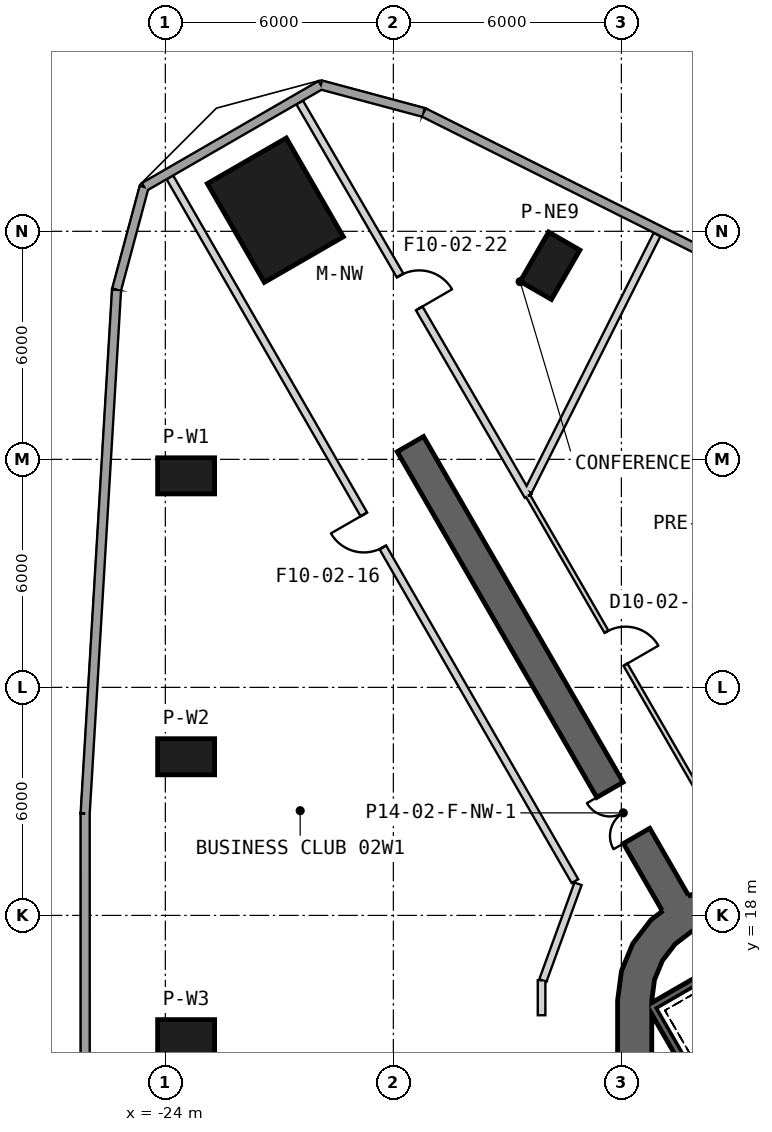
"""IFC4 building model, lengths in metres.
Left out: names, types, materials, properties, quantities, classifications, styles, units other than length and angle.
Written with IfcOpenShell. Run it as: python <this file> out.ifc"""

import sys

from ifc_helpers import new_model, si_unit, direction, frame, frame_2d, origin, origin_2d, place, context, subcontext, project, spatial, polyline, rectangle, outline, extrude, element, fill, save


model = new_model("IFC4")
c1 = context("Model", 3, precision=1e-05, world=origin(), true_north=direction((0.0, 1.0)))
c2 = subcontext(c1, "Body", "Model", "MODEL_VIEW")
j1 = project(units=[si_unit("LENGTHUNIT", "METRE"), si_unit("PLANEANGLEUNIT", "RADIAN")], contexts=[c1])
p1 = place(None, origin())
s1 = spatial("IfcSite", under=j1, at=p1, CompositionType="ELEMENT")
p2 = place(p1, origin())
s2 = spatial("IfcBuilding", under=s1, at=p2, CompositionType="ELEMENT")
p3 = place(p2, frame((0.0, 0.0, 15.5)))
s3 = spatial("IfcBuildingStorey", under=s2, at=p3, CompositionType="ELEMENT", Elevation=15.5)
p4 = place(p3, frame((-21.106, 36.556, 0.0), z_axis=(0.0, 0.0, 1.0), x_axis=(-0.5, 0.866025403784, 0.0)))
e1 = element("IfcColumn", 1, at=p4, inside=s3, PredefinedType="COLUMN", context=c2, shape_type="SweptSolid", body=[
    extrude(rectangle(XDim=3.0, YDim=2.4, at=origin_2d()), origin(), (0.0, 0.0, 1.0), 6.0),
])
for number, where, z_axis, x_axis in (
    (2, (-23.453, 29.566, 0.0), (0.0, 0.0, 1.0), (-1.0, 0.0, 0.0)),
    (3, (-23.453, 22.174, 0.0), (0.0, 0.0, 1.0), (-1.0, 0.0, 0.0)),
    (4, (-23.453, 14.783, 0.0), (0.0, 0.0, 1.0), (-1.0, 0.0, 0.0)),
    (5, (-13.878, 35.094, 0.0), (0.0, 0.0, 1.0), (0.5, 0.866, 0.0)),
):
    element("IfcColumn", number, at=place(p3, frame(where, z_axis=z_axis, x_axis=x_axis)), inside=s3, PredefinedType="COLUMN", context=c2, shape_type="SweptSolid", body=[
        extrude(rectangle(XDim=1.5, YDim=0.95, at=origin_2d()), origin(), (0.0, 0.0, 1.0), 6.0),
    ])
p5 = place(p3, frame((-11.65, 15.762, 0.0), z_axis=(0.0, 0.0, 1.0), x_axis=(0.0, -1.0, 0.0)))
e6 = element("IfcWall", 6, at=p5, inside=s3, PredefinedType="SHEAR", context=c2, shape_type="SweptSolid", body=[
    extrude(rectangle(XDim=31.523, YDim=0.9, at=frame_2d((15.762, 0.0))), origin(), (0.0, 0.0, 1.0), 6.0),
])
p6 = place(p5, frame((7.062, 0.0, 0.0)))
e7 = element("IfcOpeningElement", 7, at=p6, cuts=e6, PredefinedType="OPENING", context=c2, shape_type="SweptSolid", body=[
    extrude(rectangle(XDim=1.2, YDim=2.4, at=frame_2d((0.6, 1.2))), frame((0.0, 0.46, 0.0), z_axis=(0.0, -1.0, 0.0), x_axis=(1.0, 0.0, 0.0)), (0.0, 0.0, 1.0), 0.92),
])
p7 = place(p5, frame((9.762, 0.0, 0.0)))
e8 = element("IfcOpeningElement", 8, at=p7, cuts=e6, PredefinedType="OPENING", context=c2, shape_type="SweptSolid", body=[
    extrude(rectangle(XDim=1.2, YDim=2.4, at=frame_2d((0.6, 1.2))), frame((0.0, 0.46, 0.0), z_axis=(0.0, -1.0, 0.0), x_axis=(1.0, 0.0, 0.0)), (0.0, 0.0, 1.0), 0.92),
])
p8 = place(p5, frame((12.462, 0.0, 0.0)))
e9 = element("IfcOpeningElement", 9, at=p8, cuts=e6, PredefinedType="OPENING", context=c2, shape_type="SweptSolid", body=[
    extrude(rectangle(XDim=1.2, YDim=2.4, at=frame_2d((0.6, 1.2))), frame((0.0, 0.46, 0.0), z_axis=(0.0, -1.0, 0.0), x_axis=(1.0, 0.0, 0.0)), (0.0, 0.0, 1.0), 0.92),
])
p9 = place(p5, frame((15.162, 0.0, 0.0)))
e10 = element("IfcOpeningElement", 10, at=p9, cuts=e6, PredefinedType="OPENING", context=c2, shape_type="SweptSolid", body=[
    extrude(rectangle(XDim=1.2, YDim=2.4, at=frame_2d((0.6, 1.2))), frame((0.0, 0.46, 0.0), z_axis=(0.0, -1.0, 0.0), x_axis=(1.0, 0.0, 0.0)), (0.0, 0.0, 1.0), 0.92),
])
p10 = place(p5, frame((17.862, 0.0, 0.0)))
e11 = element("IfcOpeningElement", 11, at=p10, cuts=e6, PredefinedType="OPENING", context=c2, shape_type="SweptSolid", body=[
    extrude(rectangle(XDim=1.2, YDim=2.4, at=frame_2d((0.6, 1.2))), frame((0.0, 0.46, 0.0), z_axis=(0.0, -1.0, 0.0), x_axis=(1.0, 0.0, 0.0)), (0.0, 0.0, 1.0), 0.92),
])
p11 = place(p5, frame((20.562, 0.0, 0.0)))
e12 = element("IfcOpeningElement", 12, at=p11, cuts=e6, PredefinedType="OPENING", context=c2, shape_type="SweptSolid", body=[
    extrude(rectangle(XDim=1.2, YDim=2.4, at=frame_2d((0.6, 1.2))), frame((0.0, 0.46, 0.0), z_axis=(0.0, -1.0, 0.0), x_axis=(1.0, 0.0, 0.0)), (0.0, 0.0, 1.0), 0.92),
])
p12 = place(p5, frame((23.262, 0.0, 0.0)))
e13 = element("IfcOpeningElement", 13, at=p12, cuts=e6, PredefinedType="OPENING", context=c2, shape_type="SweptSolid", body=[
    extrude(rectangle(XDim=1.2, YDim=2.4, at=frame_2d((0.6, 1.2))), frame((0.0, 0.46, 0.0), z_axis=(0.0, -1.0, 0.0), x_axis=(1.0, 0.0, 0.0)), (0.0, 0.0, 1.0), 0.92),
])
p13 = place(p5, frame((3.612, 0.0, 0.0)))
e14 = element("IfcOpeningElement", 14, at=p13, cuts=e6, PredefinedType="OPENING", context=c2, shape_type="SweptSolid", body=[
    extrude(rectangle(XDim=1.2, YDim=2.4, at=frame_2d((0.6, 1.2))), frame((0.0, 0.46, 0.0), z_axis=(0.0, -1.0, 0.0), x_axis=(1.0, 0.0, 0.0)), (0.0, 0.0, 1.0), 0.92),
])
p14 = place(p5, frame((26.712, 0.0, 0.0)))
e15 = element("IfcOpeningElement", 15, at=p14, cuts=e6, PredefinedType="OPENING", context=c2, shape_type="SweptSolid", body=[
    extrude(rectangle(XDim=1.2, YDim=2.4, at=frame_2d((0.6, 1.2))), frame((0.0, 0.46, 0.0), z_axis=(0.0, -1.0, 0.0), x_axis=(1.0, 0.0, 0.0)), (0.0, 0.0, 1.0), 0.92),
])
p15 = place(p3, origin())
e16 = element("IfcWall", 16, at=p15, inside=s3, PredefinedType="SHEAR", context=c2, shape_type="SweptSolid", body=[
    extrude(outline(polyline([(-7.6, 18.36), (-8.323, 18.659), (-9.1, 18.762), (-9.876, 18.659), (-10.6, 18.36), (-11.221, 17.883), (-11.698, 17.262), (-11.998, 16.538), (-12.1, 15.762), (-11.2, 15.762), (-11.128, 16.305), (-10.919, 16.812), (-10.585, 17.247), (-10.15, 17.58), (-9.644, 17.79), (-9.1, 17.862), (-8.556, 17.79), (-8.05, 17.58), (-7.6, 18.36)])), origin(), (0.0, 0.0, 1.0), 6.0),
])
p16 = place(p3, frame((-10.575, 18.316, 0.0), z_axis=(0.0, 0.0, 1.0), x_axis=(-0.499996575515, 0.866027380903, 0.0)))
e17 = element("IfcWall", 17, at=p16, inside=s3, PredefinedType="SHEAR", context=c2, shape_type="SweptSolid", body=[
    extrude(rectangle(XDim=13.954, YDim=0.8, at=frame_2d((6.977, 0.0))), origin(), (0.0, 0.0, 1.0), 6.0),
])
p17 = place(p16, frame((2.05, 0.0, 0.0)))
e18 = element("IfcOpeningElement", 18, at=p17, cuts=e17, PredefinedType="OPENING", context=c2, shape_type="SweptSolid", body=[
    extrude(rectangle(XDim=1.4, YDim=2.4, at=frame_2d((0.7, 1.2))), frame((0.0, 0.41, 0.0), z_axis=(0.0, -1.0, 0.0), x_axis=(1.0, 0.0, 0.0)), (0.0, 0.0, 1.0), 0.82),
])
p18 = place(p3, frame((-4.861, 32.952, 0.0), z_axis=(0.0, 0.0, 1.0), x_axis=(-0.894285628533, 0.447496608478, 0.0)))
e19 = element("IfcWall", 19, at=p18, inside=s3, PredefinedType="SOLIDWALL", context=c2, shape_type="SweptSolid", body=[
    extrude(rectangle(XDim=13.801, YDim=0.24, at=frame_2d((6.901, 0.0))), origin(), (0.0, 0.0, 1.0), 5.7),
])
p19 = place(p3, frame((-17.203, 39.128, 0.0), z_axis=(0.0, 0.0, 1.0), x_axis=(-0.965923146675, 0.25882904535, 0.0)))
e20 = element("IfcWall", 20, at=p19, inside=s3, PredefinedType="SOLIDWALL", context=c2, shape_type="SweptSolid", body=[
    extrude(rectangle(XDim=2.801, YDim=0.24, at=frame_2d((1.4, 0.0))), origin(), (0.0, 0.0, 1.0), 5.7),
])
p20 = place(p3, frame((-19.908, 39.853, 0.0), z_axis=(0.0, 0.0, 1.0), x_axis=(-0.866010734295, -0.500025407441, 0.0)))
e21 = element("IfcWall", 21, at=p20, inside=s3, PredefinedType="SOLIDWALL", context=c2, shape_type="SweptSolid", body=[
    extrude(rectangle(XDim=5.371, YDim=0.24, at=frame_2d((2.686, 0.0))), origin(), (0.0, 0.0, 1.0), 5.7),
])
p21 = place(p3, frame((-24.56, 37.167, 0.0), z_axis=(0.0, 0.0, 1.0), x_axis=(-0.258850842196, -0.965917305723, 0.0)))
e22 = element("IfcWall", 22, at=p21, inside=s3, PredefinedType="SOLIDWALL", context=c2, shape_type="SweptSolid", body=[
    extrude(rectangle(XDim=2.8, YDim=0.24, at=frame_2d((1.4, 0.0))), origin(), (0.0, 0.0, 1.0), 5.7),
])
p22 = place(p3, frame((-25.284, 34.462, 0.0), z_axis=(0.0, 0.0, 1.0), x_axis=(-0.059807686217, -0.998209918138, 0.0)))
e23 = element("IfcWall", 23, at=p22, inside=s3, PredefinedType="SOLIDWALL", context=c2, shape_type="SweptSolid", body=[
    extrude(rectangle(XDim=13.802, YDim=0.24, at=frame_2d((6.901, 0.0))), origin(), (0.0, 0.0, 1.0), 5.7),
])
p23 = place(p3, frame((-26.11, 20.685, 0.0), z_axis=(0.0, 0.0, 1.0), x_axis=(6.9319284e-05, -0.999999997597, 0.0)))
e24 = element("IfcWall", 24, at=p23, inside=s3, PredefinedType="SOLIDWALL", context=c2, shape_type="SweptSolid", body=[
    extrude(rectangle(XDim=10.566, YDim=0.24, at=frame_2d((5.283, 0.0))), origin(), (0.0, 0.0, 1.0), 5.7),
])
p24 = place(p3, frame((-11.245, 15.678, -0.3), z_axis=(0.0, 0.0, 1.0), x_axis=(0.499977274689, -0.866038523851, 0.0)))
e25 = element("IfcWall", 25, at=p24, inside=s3, PredefinedType="SHEAR", context=c2, shape_type="SweptSolid", body=[
    extrude(rectangle(XDim=8.1, YDim=0.2, at=frame_2d((4.05, 0.0))), origin(), (0.0, 0.0, 1.0), 6.0),
])
p25 = place(p3, frame((-9.645, 16.486, -0.3), z_axis=(0.0, 0.0, 1.0), x_axis=(-0.866038843867, -0.499976720371, 0.0)))
e26 = element("IfcWall", 26, at=p25, inside=s3, PredefinedType="SHEAR", context=c2, shape_type="SweptSolid", body=[
    extrude(rectangle(XDim=1.69, YDim=0.2, at=frame_2d((0.845, 0.0))), origin(), (0.0, 0.0, 1.0), 6.0),
])
p26 = place(p3, frame((-14.1, 16.294, 0.0), z_axis=(0.0, 0.0, 1.0), x_axis=(0.0, -1.0, 0.0)))
e27 = element("IfcWall", 27, at=p26, inside=s3, PredefinedType="PARTITIONING", context=c2, shape_type="SweptSolid", body=[
    extrude(rectangle(XDim=0.92, YDim=0.2, at=frame_2d((0.46, 0.0))), origin(), (0.0, 0.0, 1.0), 5.7),
])
p27 = place(p3, frame((-13.141, 18.831, 0.0), z_axis=(0.0, 0.0, 1.0), x_axis=(-0.34184444978, -0.939756549408, 0.0)))
e28 = element("IfcWall", 28, at=p27, inside=s3, PredefinedType="PARTITIONING", context=c2, shape_type="SweptSolid", body=[
    extrude(rectangle(XDim=2.707, YDim=0.2, at=frame_2d((1.354, 0.0))), origin(), (0.0, 0.0, 1.0), 4.78),
])
p28 = place(p3, frame((-13.222, 18.901, 0.0), z_axis=(0.0, 0.0, 1.0), x_axis=(-0.498838585436, 0.866694909227, 0.0)))
e29 = element("IfcWall", 29, at=p28, inside=s3, PredefinedType="PARTITIONING", context=c2, shape_type="SweptSolid", body=[
    extrude(rectangle(XDim=21.368, YDim=0.2, at=frame_2d((10.684, 0.0))), origin(), (0.0, 0.0, 1.0), 5.7),
])
p29 = place(p28, frame((10.134, 0.0, 0.0)))
e30 = element("IfcOpeningElement", 30, at=p29, cuts=e29, PredefinedType="OPENING", context=c2, shape_type="SweptSolid", body=[
    extrude(rectangle(XDim=1.0, YDim=2.1, at=frame_2d((0.5, 1.05))), frame((0.0, 0.11, 0.0), z_axis=(0.0, -1.0, 0.0), x_axis=(1.0, 0.0, 0.0)), (0.0, 0.0, 1.0), 0.22),
])
p30 = place(p3, frame((-14.455, 29.037, 0.0), z_axis=(0.0, 0.0, 1.0), x_axis=(0.500000422144, -0.866025160059, 0.0)))
e31 = element("IfcWall", 31, at=p30, inside=s3, PredefinedType="PARTITIONING", context=c2, shape_type="SweptSolid", body=[
    extrude(rectangle(XDim=9.554, YDim=0.12, at=frame_2d((4.777, 0.0))), origin(), (0.0, 0.0, 1.0), 5.7),
])
p31 = place(p30, frame((4.127, 0.0, 0.0)))
e32 = element("IfcOpeningElement", 32, at=p31, cuts=e31, PredefinedType="OPENING", context=c2, shape_type="SweptSolid", body=[
    extrude(rectangle(XDim=1.0, YDim=2.1, at=frame_2d((0.5, 1.05))), frame((0.0, 0.07, 0.0), z_axis=(0.0, -1.0, 0.0), x_axis=(1.0, 0.0, 0.0)), (0.0, 0.0, 1.0), 0.14),
])
p32 = place(p3, frame((-20.466, 39.392, 0.0), z_axis=(0.0, 0.0, 1.0), x_axis=(0.502069597937, -0.86482721906, 0.0)))
e33 = element("IfcWall", 33, at=p32, inside=s3, PredefinedType="PARTITIONING", context=c2, shape_type="SweptSolid", body=[
    extrude(rectangle(XDim=11.973, YDim=0.2, at=frame_2d((5.986, 0.0))), origin(), (0.0, 0.0, 1.0), 5.7),
])
p33 = place(p32, frame((5.267, 0.0, 0.0)))
e34 = element("IfcOpeningElement", 34, at=p33, cuts=e33, PredefinedType="OPENING", context=c2, shape_type="SweptSolid", body=[
    extrude(rectangle(XDim=1.0, YDim=2.1, at=frame_2d((0.5, 1.05))), frame((0.0, 0.11, 0.0), z_axis=(0.0, -1.0, 0.0), x_axis=(1.0, 0.0, 0.0)), (0.0, 0.0, 1.0), 0.22),
])
p34 = place(p3, frame((-11.061, 35.915, 0.0), z_axis=(0.0, 0.0, 1.0), x_axis=(-0.448736604458, -0.893664064299, 0.0)))
e35 = element("IfcWall", 35, at=p34, inside=s3, PredefinedType="PARTITIONING", context=c2, shape_type="SweptSolid", body=[
    extrude(rectangle(XDim=7.563, YDim=0.2, at=frame_2d((3.781, 0.0))), origin(), (0.0, 0.0, 1.0), 4.78),
])
p35 = place(p29, origin())
e36 = element("IfcDoor", 36, at=p35, inside=s3, OperationType="SINGLE_SWING_RIGHT", PredefinedType="USERDEFINED", context=c2, shape_type="SweptSolid", body=[
    extrude(rectangle(XDim=1.0, YDim=2.1, at=frame_2d((0.5, 1.05))), frame((0.0, 0.025, 0.0), z_axis=(0.0, -1.0, 0.0), x_axis=(1.0, 0.0, 0.0)), (0.0, 0.0, 1.0), 0.05),
])
fill(e30, e36)
p36 = place(p31, origin())
e37 = element("IfcDoor", 37, at=p36, inside=s3, OperationType="SINGLE_SWING_RIGHT", PredefinedType="NOTDEFINED", context=c2, shape_type="SweptSolid", body=[
    extrude(rectangle(XDim=1.0, YDim=2.1, at=frame_2d((0.5, 1.05))), frame((0.0, 0.025, 0.0), z_axis=(0.0, -1.0, 0.0), x_axis=(1.0, 0.0, 0.0)), (0.0, 0.0, 1.0), 0.05),
])
fill(e32, e37)
p37 = place(p33, origin())
e38 = element("IfcDoor", 38, at=p37, inside=s3, OperationType="SINGLE_SWING_RIGHT", PredefinedType="USERDEFINED", context=c2, shape_type="SweptSolid", body=[
    extrude(rectangle(XDim=1.0, YDim=2.1, at=frame_2d((0.5, 1.05))), frame((0.0, 0.025, 0.0), z_axis=(0.0, -1.0, 0.0), x_axis=(1.0, 0.0, 0.0)), (0.0, 0.0, 1.0), 0.05),
])
fill(e34, e38)
p38 = place(p17, origin())
e39 = element("IfcDoor", 39, at=p38, inside=s3, OperationType="DOUBLE_DOOR_SINGLE_SWING", PredefinedType="NOTDEFINED", context=c2, shape_type="SweptSolid", body=[
    extrude(rectangle(XDim=1.4, YDim=2.4, at=frame_2d((0.7, 1.2))), frame((0.0, 0.025, 0.0), z_axis=(0.0, -1.0, 0.0), x_axis=(1.0, 0.0, 0.0)), (0.0, 0.0, 1.0), 0.05),
])
fill(e18, e39)
save(model, sys.argv[1])
